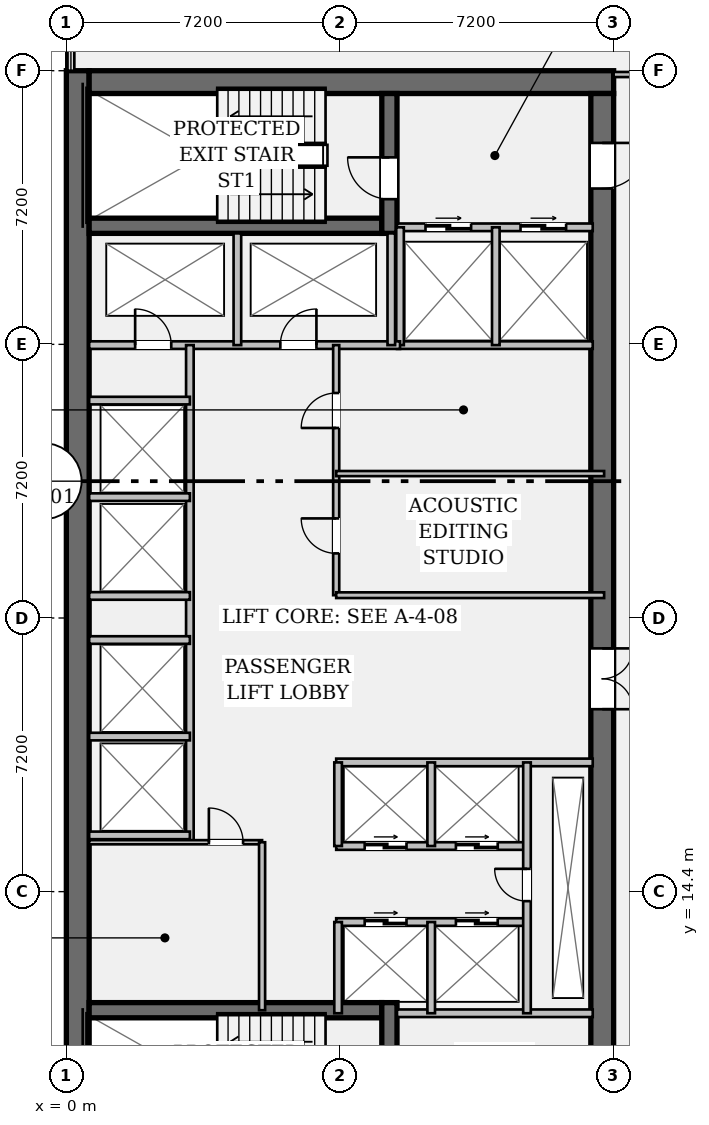
"""IFC4 building model, lengths in metres.
Left out: names, types, materials, properties, quantities, classifications, styles, units other than length and angle.
Written with IfcOpenShell. Run it as: python <this file> out.ifc"""

import sys

from ifc_helpers import new_model, si_unit, direction, frame, frame_2d, origin, place, context, subcontext, project, spatial, rectangle, extrude, element, fill, save


model = new_model("IFC4")
c1 = context("Model", 3, precision=1e-05, world=origin(), true_north=direction((0.0, 1.0)))
c2 = subcontext(c1, "Body", "Model", "MODEL_VIEW")
j1 = project(units=[si_unit("LENGTHUNIT", "METRE"), si_unit("PLANEANGLEUNIT", "RADIAN")], contexts=[c1])
p1 = place(None, origin())
s1 = spatial("IfcSite", under=j1, at=p1, CompositionType="ELEMENT")
p2 = place(p1, origin())
s2 = spatial("IfcBuilding", under=s1, at=p2, CompositionType="ELEMENT")
p3 = place(p2, frame((0.0, 0.0, 125.3)))
s3 = spatial("IfcBuildingStorey", under=s2, at=p3, CompositionType="ELEMENT", Elevation=125.3)
p4 = place(p3, frame((0.3, 7.2, 0.0), z_axis=(0.0, 0.0, 1.0), x_axis=(0.0, 1.0, 0.0)))
e1 = element("IfcWall", 1, at=p4, inside=s3, PredefinedType="SHEAR", context=c2, shape_type="SweptSolid", body=[
    extrude(rectangle(XDim=28.8, YDim=0.6, at=frame_2d((14.4, 0.0))), origin(), (0.0, 0.0, 1.0), 3.58),
])
p5 = place(p3, frame((0.6, 35.7, 0.0), z_axis=(0.0, 0.0, 1.0), x_axis=(1.0, 0.0, 0.0)))
e2 = element("IfcWall", 2, at=p5, inside=s3, PredefinedType="SHEAR", context=c2, shape_type="SweptSolid", body=[
    extrude(rectangle(XDim=13.8, YDim=0.6, at=frame_2d((6.9, 0.0))), origin(), (0.0, 0.0, 1.0), 3.58),
])
p6 = place(p3, frame((14.1, 35.4, 0.0), z_axis=(0.0, 0.0, 1.0), x_axis=(0.0, -1.0, 0.0)))
e3 = element("IfcWall", 3, at=p6, inside=s3, PredefinedType="SHEAR", context=c2, shape_type="SweptSolid", body=[
    extrude(rectangle(XDim=27.6, YDim=0.6, at=frame_2d((13.8, 0.0))), origin(), (0.0, 0.0, 1.0), 3.58),
])
p7 = place(p6, frame((1.3, 0.0, 0.0)))
e4 = element("IfcOpeningElement", 4, at=p7, cuts=e3, PredefinedType="OPENING", context=c2, shape_type="SweptSolid", body=[
    extrude(rectangle(XDim=1.2, YDim=2.15, at=frame_2d((0.6, 1.075))), frame((0.0, 0.312, 0.0), z_axis=(0.0, -1.0, 0.0), x_axis=(1.0, 0.0, 0.0)), (0.0, 0.0, 1.0), 0.624),
])
p8 = place(p6, frame((25.25, 0.0, 0.0)))
e5 = element("IfcOpeningElement", 5, at=p8, cuts=e3, PredefinedType="OPENING", context=c2, shape_type="SweptSolid", body=[
    extrude(rectangle(XDim=1.2, YDim=2.15, at=frame_2d((0.6, 1.075))), frame((0.0, 0.312, 0.0), z_axis=(0.0, -1.0, 0.0), x_axis=(1.0, 0.0, 0.0)), (0.0, 0.0, 1.0), 0.624),
])
p9 = place(p6, frame((14.6, 0.0, 0.0)))
e6 = element("IfcOpeningElement", 6, at=p9, cuts=e3, PredefinedType="OPENING", context=c2, shape_type="SweptSolid", body=[
    extrude(rectangle(XDim=1.6, YDim=2.2, at=frame_2d((0.8, 1.1))), frame((0.0, 0.312, 0.0), z_axis=(0.0, -1.0, 0.0), x_axis=(1.0, 0.0, 0.0)), (0.0, 0.0, 1.0), 0.624),
])
for number, where, z_axis, x_axis in (
    (7, (0.6, 31.92, 0.0), (0.0, 0.0, 1.0), (1.0, 0.0, 0.0)),
    (8, (0.6, 11.28, 0.0), (0.0, 0.0, 1.0), (1.0, 0.0, 0.0)),
):
    element("IfcWall", number, at=place(p3, frame(where, z_axis=z_axis, x_axis=x_axis)), inside=s3, PredefinedType="SHEAR", context=c2, shape_type="SweptSolid", body=[
        extrude(rectangle(XDim=7.7, YDim=0.4, at=frame_2d((3.85, 0.0))), origin(), (0.0, 0.0, 1.0), 3.58),
    ])
p10 = place(p3, frame((8.5, 31.72, 0.0), z_axis=(0.0, 0.0, 1.0), x_axis=(0.0, 1.0, 0.0)))
e9 = element("IfcWall", 9, at=p10, inside=s3, PredefinedType="SHEAR", context=c2, shape_type="SweptSolid", body=[
    extrude(rectangle(XDim=3.68, YDim=0.4, at=frame_2d((1.84, 0.0))), origin(), (0.0, 0.0, 1.0), 3.58),
])
p11 = place(p10, frame((0.9, 0.0, 0.0)))
e10 = element("IfcOpeningElement", 10, at=p11, cuts=e9, PredefinedType="OPENING", context=c2, shape_type="SweptSolid", body=[
    extrude(rectangle(XDim=1.1, YDim=2.15, at=frame_2d((0.55, 1.075))), frame((0.0, 0.212, 0.0), z_axis=(0.0, -1.0, 0.0), x_axis=(1.0, 0.0, 0.0)), (0.0, 0.0, 1.0), 0.424),
])
p12 = place(p3, frame((8.5, 7.8, 0.0), z_axis=(0.0, 0.0, 1.0), x_axis=(0.0, 1.0, 0.0)))
e11 = element("IfcWall", 11, at=p12, inside=s3, PredefinedType="SHEAR", context=c2, shape_type="SweptSolid", body=[
    extrude(rectangle(XDim=3.68, YDim=0.4, at=frame_2d((1.84, 0.0))), origin(), (0.0, 0.0, 1.0), 3.58),
])
p13 = place(p12, frame((0.85, 0.0, 0.0)))
e12 = element("IfcOpeningElement", 12, at=p13, cuts=e11, PredefinedType="OPENING", context=c2, shape_type="SweptSolid", body=[
    extrude(rectangle(XDim=1.1, YDim=2.15, at=frame_2d((0.55, 1.075))), frame((0.0, 0.212, 0.0), z_axis=(0.0, -1.0, 0.0), x_axis=(1.0, 0.0, 0.0)), (0.0, 0.0, 1.0), 0.424),
])
p14 = place(p3, frame((8.7, 31.88, 0.0), z_axis=(0.0, 0.0, 1.0), x_axis=(1.0, 0.0, 0.0)))
e13 = element("IfcWall", 13, at=p14, inside=s3, PredefinedType="PARTITIONING", context=c2, shape_type="SweptSolid", body=[
    extrude(rectangle(XDim=5.15, YDim=0.2, at=frame_2d((2.575, 0.0))), origin(), (0.0, 0.0, 1.0), 3.58),
])
p15 = place(p14, frame((0.75, 0.0, 0.0)))
e14 = element("IfcOpeningElement", 14, at=p15, cuts=e13, PredefinedType="OPENING", context=c2, shape_type="SweptSolid", body=[
    extrude(rectangle(XDim=1.2, YDim=2.2, at=frame_2d((0.6, 1.1))), frame((0.0, 0.112, 0.0), z_axis=(0.0, -1.0, 0.0), x_axis=(1.0, 0.0, 0.0)), (0.0, 0.0, 1.0), 0.224),
])
p16 = place(p14, frame((3.25, 0.0, 0.0)))
e15 = element("IfcOpeningElement", 15, at=p16, cuts=e13, PredefinedType="OPENING", context=c2, shape_type="SweptSolid", body=[
    extrude(rectangle(XDim=1.2, YDim=2.2, at=frame_2d((0.6, 1.1))), frame((0.0, 0.112, 0.0), z_axis=(0.0, -1.0, 0.0), x_axis=(1.0, 0.0, 0.0)), (0.0, 0.0, 1.0), 0.224),
])
for number, where, z_axis, x_axis in (
    (16, (8.7, 11.2, 0.0), (0.0, 0.0, 1.0), (1.0, 0.0, 0.0)),
    (17, (8.7, 28.78, 0.0), (0.0, 0.0, 1.0), (1.0, 0.0, 0.0)),
):
    element("IfcWall", number, at=place(p3, frame(where, z_axis=z_axis, x_axis=x_axis)), inside=s3, PredefinedType="PARTITIONING", context=c2, shape_type="SweptSolid", body=[
        extrude(rectangle(XDim=5.15, YDim=0.2, at=frame_2d((2.575, 0.0))), origin(), (0.0, 0.0, 1.0), 3.58),
    ])
for number, where, z_axis, x_axis in (
    (18, (8.78, 28.78, 0.0), (0.0, 0.0, 1.0), (0.0, 1.0, 0.0)),
    (19, (11.3, 28.78, 0.0), (0.0, 0.0, 1.0), (0.0, 1.0, 0.0)),
):
    element("IfcWall", number, at=place(p3, frame(where, z_axis=z_axis, x_axis=x_axis)), inside=s3, PredefinedType="PARTITIONING", context=c2, shape_type="SweptSolid", body=[
        extrude(rectangle(XDim=3.1, YDim=0.2, at=frame_2d((1.55, 0.0))), origin(), (0.0, 0.0, 1.0), 3.58),
    ])
p17 = place(p3, frame((0.6, 28.78, 0.0), z_axis=(0.0, 0.0, 1.0), x_axis=(1.0, 0.0, 0.0)))
e20 = element("IfcWall", 20, at=p17, inside=s3, PredefinedType="PARTITIONING", context=c2, shape_type="SweptSolid", body=[
    extrude(rectangle(XDim=8.18, YDim=0.2, at=frame_2d((4.09, 0.0))), origin(), (0.0, 0.0, 1.0), 3.58),
])
p18 = place(p17, frame((1.21, 0.0, 0.0)))
e21 = element("IfcOpeningElement", 21, at=p18, cuts=e20, PredefinedType="OPENING", context=c2, shape_type="SweptSolid", body=[
    extrude(rectangle(XDim=0.95, YDim=2.15, at=frame_2d((0.475, 1.075))), frame((0.0, 0.112, 0.0), z_axis=(0.0, -1.0, 0.0), x_axis=(1.0, 0.0, 0.0)), (0.0, 0.0, 1.0), 0.224),
])
p19 = place(p17, frame((5.03, 0.0, 0.0)))
e22 = element("IfcOpeningElement", 22, at=p19, cuts=e20, PredefinedType="OPENING", context=c2, shape_type="SweptSolid", body=[
    extrude(rectangle(XDim=0.95, YDim=2.15, at=frame_2d((0.475, 1.075))), frame((0.0, 0.112, 0.0), z_axis=(0.0, -1.0, 0.0), x_axis=(1.0, 0.0, 0.0)), (0.0, 0.0, 1.0), 0.224),
])
for number, where, z_axis, x_axis in (
    (23, (4.5, 28.78, 0.0), (0.0, 0.0, 1.0), (0.0, 1.0, 0.0)),
    (24, (8.55, 28.78, 0.0), (0.0, 0.0, 1.0), (0.0, 1.0, 0.0)),
):
    element("IfcWall", number, at=place(p3, frame(where, z_axis=z_axis, x_axis=x_axis)), inside=s3, PredefinedType="PARTITIONING", context=c2, shape_type="SweptSolid", body=[
        extrude(rectangle(XDim=2.94, YDim=0.2, at=frame_2d((1.47, 0.0))), origin(), (0.0, 0.0, 1.0), 3.58),
    ])
p20 = place(p3, frame((3.25, 15.7, 0.0), z_axis=(0.0, 0.0, 1.0), x_axis=(0.0, 1.0, 0.0)))
e25 = element("IfcWall", 25, at=p20, inside=s3, PredefinedType="PARTITIONING", context=c2, shape_type="SweptSolid", body=[
    extrude(rectangle(XDim=13.08, YDim=0.2, at=frame_2d((6.54, 0.0))), origin(), (0.0, 0.0, 1.0), 3.58),
])
for number, where, z_axis, x_axis in (
    (26, (0.6, 15.88, 0.0), (0.0, 0.0, 1.0), (1.0, 0.0, 0.0)),
    (27, (0.6, 18.48, 0.0), (0.0, 0.0, 1.0), (1.0, 0.0, 0.0)),
    (28, (0.6, 22.18, 0.0), (0.0, 0.0, 1.0), (1.0, 0.0, 0.0)),
    (29, (0.6, 24.78, 0.0), (0.0, 0.0, 1.0), (1.0, 0.0, 0.0)),
    (30, (0.6, 21.02, 0.0), (0.0, 0.0, 1.0), (1.0, 0.0, 0.0)),
    (31, (0.6, 27.32, 0.0), (0.0, 0.0, 1.0), (1.0, 0.0, 0.0)),
):
    element("IfcWall", number, at=place(p3, frame(where, z_axis=z_axis, x_axis=x_axis)), inside=s3, PredefinedType="PARTITIONING", context=c2, shape_type="SweptSolid", body=[
        extrude(rectangle(XDim=2.65, YDim=0.2, at=frame_2d((1.325, 0.0))), origin(), (0.0, 0.0, 1.0), 3.58),
    ])
p21 = place(p3, frame((7.1, 22.2, 0.0), z_axis=(0.0, 0.0, 1.0), x_axis=(0.0, 1.0, 0.0)))
e32 = element("IfcWall", 32, at=p21, inside=s3, PredefinedType="PARTITIONING", context=c2, shape_type="SweptSolid", body=[
    extrude(rectangle(XDim=6.58, YDim=0.16, at=frame_2d((3.29, 0.0))), origin(), (0.0, 0.0, 1.0), 3.58),
])
p22 = place(p21, frame((1.1, 0.0, 0.0)))
e33 = element("IfcOpeningElement", 33, at=p22, cuts=e32, PredefinedType="OPENING", context=c2, shape_type="SweptSolid", body=[
    extrude(rectangle(XDim=0.92, YDim=2.15, at=frame_2d((0.46, 1.075))), frame((0.0, 0.092, 0.0), z_axis=(0.0, -1.0, 0.0), x_axis=(1.0, 0.0, 0.0)), (0.0, 0.0, 1.0), 0.184),
])
p23 = place(p21, frame((4.4, 0.0, 0.0)))
e34 = element("IfcOpeningElement", 34, at=p23, cuts=e32, PredefinedType="OPENING", context=c2, shape_type="SweptSolid", body=[
    extrude(rectangle(XDim=0.92, YDim=2.15, at=frame_2d((0.46, 1.075))), frame((0.0, 0.092, 0.0), z_axis=(0.0, -1.0, 0.0), x_axis=(1.0, 0.0, 0.0)), (0.0, 0.0, 1.0), 0.184),
])
p24 = place(p3, frame((7.1, 22.2, 0.0), z_axis=(0.0, 0.0, 1.0), x_axis=(1.0, 0.0, 0.0)))
e35 = element("IfcWall", 35, at=p24, inside=s3, PredefinedType="PARTITIONING", context=c2, shape_type="SweptSolid", body=[
    extrude(rectangle(XDim=7.05, YDim=0.15, at=frame_2d((3.525, 0.0))), origin(), (0.0, 0.0, 1.0), 3.58),
])
p25 = place(p3, frame((7.1, 25.4, 0.0), z_axis=(0.0, 0.0, 1.0), x_axis=(1.0, 0.0, 0.0)))
e36 = element("IfcWall", 36, at=p25, inside=s3, PredefinedType="PARTITIONING", context=c2, shape_type="SweptSolid", body=[
    extrude(rectangle(XDim=7.05, YDim=0.135, at=frame_2d((3.525, 0.0))), origin(), (0.0, 0.0, 1.0), 3.58),
])
p26 = place(p3, frame((7.1, 17.8, 0.0), z_axis=(0.0, 0.0, 1.0), x_axis=(1.0, 0.0, 0.0)))
e37 = element("IfcWall", 37, at=p26, inside=s3, PredefinedType="PARTITIONING", context=c2, shape_type="SweptSolid", body=[
    extrude(rectangle(XDim=6.75, YDim=0.2, at=frame_2d((3.375, 0.0))), origin(), (0.0, 0.0, 1.0), 3.58),
])
p27 = place(p3, frame((7.1, 15.6, 0.0), z_axis=(0.0, 0.0, 1.0), x_axis=(1.0, 0.0, 0.0)))
e38 = element("IfcWall", 38, at=p27, inside=s3, PredefinedType="PARTITIONING", context=c2, shape_type="SweptSolid", body=[
    extrude(rectangle(XDim=5.02, YDim=0.2, at=frame_2d((2.51, 0.0))), origin(), (0.0, 0.0, 1.0), 3.58),
])
p28 = place(p27, frame((0.75, 0.0, 0.0)))
e39 = element("IfcOpeningElement", 39, at=p28, cuts=e38, PredefinedType="OPENING", context=c2, shape_type="SweptSolid", body=[
    extrude(rectangle(XDim=1.1, YDim=2.2, at=frame_2d((0.55, 1.1))), frame((0.0, 0.112, 0.0), z_axis=(0.0, -1.0, 0.0), x_axis=(1.0, 0.0, 0.0)), (0.0, 0.0, 1.0), 0.224),
])
p29 = place(p27, frame((3.15, 0.0, 0.0)))
e40 = element("IfcOpeningElement", 40, at=p29, cuts=e38, PredefinedType="OPENING", context=c2, shape_type="SweptSolid", body=[
    extrude(rectangle(XDim=1.1, YDim=2.2, at=frame_2d((0.55, 1.1))), frame((0.0, 0.112, 0.0), z_axis=(0.0, -1.0, 0.0), x_axis=(1.0, 0.0, 0.0)), (0.0, 0.0, 1.0), 0.224),
])
p30 = place(p3, frame((7.1, 13.6, 0.0), z_axis=(0.0, 0.0, 1.0), x_axis=(1.0, 0.0, 0.0)))
e41 = element("IfcWall", 41, at=p30, inside=s3, PredefinedType="PARTITIONING", context=c2, shape_type="SweptSolid", body=[
    extrude(rectangle(XDim=5.02, YDim=0.2, at=frame_2d((2.51, 0.0))), origin(), (0.0, 0.0, 1.0), 3.58),
])
p31 = place(p30, frame((0.75, 0.0, 0.0)))
e42 = element("IfcOpeningElement", 42, at=p31, cuts=e41, PredefinedType="OPENING", context=c2, shape_type="SweptSolid", body=[
    extrude(rectangle(XDim=1.1, YDim=2.2, at=frame_2d((0.55, 1.1))), frame((0.0, 0.112, 0.0), z_axis=(0.0, -1.0, 0.0), x_axis=(1.0, 0.0, 0.0)), (0.0, 0.0, 1.0), 0.224),
])
p32 = place(p30, frame((3.15, 0.0, 0.0)))
e43 = element("IfcOpeningElement", 43, at=p32, cuts=e41, PredefinedType="OPENING", context=c2, shape_type="SweptSolid", body=[
    extrude(rectangle(XDim=1.1, YDim=2.2, at=frame_2d((0.55, 1.1))), frame((0.0, 0.112, 0.0), z_axis=(0.0, -1.0, 0.0), x_axis=(1.0, 0.0, 0.0)), (0.0, 0.0, 1.0), 0.224),
])
p33 = place(p3, frame((7.15, 15.6, 0.0), z_axis=(0.0, 0.0, 1.0), x_axis=(0.0, 1.0, 0.0)))
e44 = element("IfcWall", 44, at=p33, inside=s3, PredefinedType="PARTITIONING", context=c2, shape_type="SweptSolid", body=[
    extrude(rectangle(XDim=2.2, YDim=0.2, at=frame_2d((1.1, 0.0))), origin(), (0.0, 0.0, 1.0), 3.58),
])
p34 = place(p3, frame((7.15, 11.2, 0.0), z_axis=(0.0, 0.0, 1.0), x_axis=(0.0, 1.0, 0.0)))
e45 = element("IfcWall", 45, at=p34, inside=s3, PredefinedType="PARTITIONING", context=c2, shape_type="SweptSolid", body=[
    extrude(rectangle(XDim=2.4, YDim=0.2, at=frame_2d((1.2, 0.0))), origin(), (0.0, 0.0, 1.0), 3.58),
])
p35 = place(p3, frame((9.6, 15.6, 0.0), z_axis=(0.0, 0.0, 1.0), x_axis=(0.0, 1.0, 0.0)))
e46 = element("IfcWall", 46, at=p35, inside=s3, PredefinedType="PARTITIONING", context=c2, shape_type="SweptSolid", body=[
    extrude(rectangle(XDim=2.2, YDim=0.2, at=frame_2d((1.1, 0.0))), origin(), (0.0, 0.0, 1.0), 3.58),
])
p36 = place(p3, frame((9.6, 11.2, 0.0), z_axis=(0.0, 0.0, 1.0), x_axis=(0.0, 1.0, 0.0)))
e47 = element("IfcWall", 47, at=p36, inside=s3, PredefinedType="PARTITIONING", context=c2, shape_type="SweptSolid", body=[
    extrude(rectangle(XDim=2.4, YDim=0.2, at=frame_2d((1.2, 0.0))), origin(), (0.0, 0.0, 1.0), 3.58),
])
p37 = place(p3, frame((12.12, 11.2, 0.0), z_axis=(0.0, 0.0, 1.0), x_axis=(0.0, 1.0, 0.0)))
e48 = element("IfcWall", 48, at=p37, inside=s3, PredefinedType="PARTITIONING", context=c2, shape_type="SweptSolid", body=[
    extrude(rectangle(XDim=6.6, YDim=0.2, at=frame_2d((3.3, 0.0))), origin(), (0.0, 0.0, 1.0), 3.58),
])
p38 = place(p37, frame((2.95, 0.0, 0.0)))
e49 = element("IfcOpeningElement", 49, at=p38, cuts=e48, PredefinedType="OPENING", context=c2, shape_type="SweptSolid", body=[
    extrude(rectangle(XDim=0.85, YDim=2.15, at=frame_2d((0.425, 1.075))), frame((0.0, 0.112, 0.0), z_axis=(0.0, -1.0, 0.0), x_axis=(1.0, 0.0, 0.0)), (0.0, 0.0, 1.0), 0.224),
])
p39 = place(p3, frame((0.6, 15.7, 0.0), z_axis=(0.0, 0.0, 1.0), x_axis=(1.0, 0.0, 0.0)))
e50 = element("IfcWall", 50, at=p39, inside=s3, PredefinedType="PARTITIONING", context=c2, shape_type="SweptSolid", body=[
    extrude(rectangle(XDim=4.55, YDim=0.11, at=frame_2d((2.275, 0.0))), origin(), (0.0, 0.0, 1.0), 3.58),
])
p40 = place(p39, frame((3.15, 0.0, 0.0)))
e51 = element("IfcOpeningElement", 51, at=p40, cuts=e50, PredefinedType="OPENING", context=c2, shape_type="SweptSolid", body=[
    extrude(rectangle(XDim=0.9, YDim=2.15, at=frame_2d((0.45, 1.075))), frame((0.0, 0.067, 0.0), z_axis=(0.0, -1.0, 0.0), x_axis=(1.0, 0.0, 0.0)), (0.0, 0.0, 1.0), 0.134),
])
p41 = place(p3, frame((5.15, 11.28, 0.0), z_axis=(0.0, 0.0, 1.0), x_axis=(0.0, 1.0, 0.0)))
e52 = element("IfcWall", 52, at=p41, inside=s3, PredefinedType="PARTITIONING", context=c2, shape_type="SweptSolid", body=[
    extrude(rectangle(XDim=4.42, YDim=0.16, at=frame_2d((2.21, 0.0))), origin(), (0.0, 0.0, 1.0), 3.58),
])
p42 = place(p3, frame((14.4, 35.9, 0.0), z_axis=(0.0, 0.0, 1.0), x_axis=(1.0, 0.0, 0.0)))
e53 = element("IfcWall", 53, at=p42, inside=s3, PredefinedType="PARTITIONING", context=c2, shape_type="SweptSolid", body=[
    extrude(rectangle(XDim=2.95, YDim=0.135, at=frame_2d((1.475, 0.0))), origin(), (0.0, 0.0, 1.0), 2.869),
])
p43 = place(p42, frame((0.95, 0.0, 0.0)))
e54 = element("IfcOpeningElement", 54, at=p43, cuts=e53, PredefinedType="OPENING", context=c2, shape_type="SweptSolid", body=[
    extrude(rectangle(XDim=1.0, YDim=2.15, at=frame_2d((0.5, 1.075))), frame((0.0, 0.08, 0.0), z_axis=(0.0, -1.0, 0.0), x_axis=(1.0, 0.0, 0.0)), (0.0, 0.0, 1.0), 0.159),
])
p44 = place(p11, origin())
e55 = element("IfcDoor", 55, at=p44, inside=s3, OperationType="SINGLE_SWING_RIGHT", PredefinedType="DOOR", context=c2, shape_type="SweptSolid", body=[
    extrude(rectangle(XDim=1.1, YDim=2.15, at=frame_2d((0.55, 1.075))), frame((0.0, 0.025, 0.0), z_axis=(0.0, -1.0, 0.0), x_axis=(1.0, 0.0, 0.0)), (0.0, 0.0, 1.0), 0.05),
])
fill(e10, e55)
p45 = place(p7, origin())
e56 = element("IfcDoor", 56, at=p45, inside=s3, OperationType="SINGLE_SWING_LEFT", PredefinedType="DOOR", context=c2, shape_type="SweptSolid", body=[
    extrude(rectangle(XDim=1.2, YDim=2.15, at=frame_2d((0.6, 1.075))), frame((0.0, 0.025, 0.0), z_axis=(0.0, -1.0, 0.0), x_axis=(1.0, 0.0, 0.0)), (0.0, 0.0, 1.0), 0.05),
])
fill(e4, e56)
p46 = place(p15, origin())
e57 = element("IfcDoor", 57, at=p46, inside=s3, OperationType="DOUBLE_DOOR_SLIDING", PredefinedType="DOOR", context=c2, shape_type="SweptSolid", body=[
    extrude(rectangle(XDim=1.2, YDim=2.2, at=frame_2d((0.6, 1.1))), frame((0.0, 0.025, 0.0), z_axis=(0.0, -1.0, 0.0), x_axis=(1.0, 0.0, 0.0)), (0.0, 0.0, 1.0), 0.05),
])
fill(e14, e57)
p47 = place(p16, origin())
e58 = element("IfcDoor", 58, at=p47, inside=s3, OperationType="DOUBLE_DOOR_SLIDING", PredefinedType="DOOR", context=c2, shape_type="SweptSolid", body=[
    extrude(rectangle(XDim=1.2, YDim=2.2, at=frame_2d((0.6, 1.1))), frame((0.0, 0.025, 0.0), z_axis=(0.0, -1.0, 0.0), x_axis=(1.0, 0.0, 0.0)), (0.0, 0.0, 1.0), 0.05),
])
fill(e15, e58)
p48 = place(p18, origin())
e59 = element("IfcDoor", 59, at=p48, inside=s3, OperationType="SINGLE_SWING_LEFT", PredefinedType="DOOR", context=c2, shape_type="SweptSolid", body=[
    extrude(rectangle(XDim=0.95, YDim=2.15, at=frame_2d((0.475, 1.075))), frame((0.0, 0.025, 0.0), z_axis=(0.0, -1.0, 0.0), x_axis=(1.0, 0.0, 0.0)), (0.0, 0.0, 1.0), 0.05),
])
fill(e21, e59)
p49 = place(p19, origin())
e60 = element("IfcDoor", 60, at=p49, inside=s3, OperationType="SINGLE_SWING_RIGHT", PredefinedType="DOOR", context=c2, shape_type="SweptSolid", body=[
    extrude(rectangle(XDim=0.95, YDim=2.15, at=frame_2d((0.475, 1.075))), frame((0.0, 0.025, 0.0), z_axis=(0.0, -1.0, 0.0), x_axis=(1.0, 0.0, 0.0)), (0.0, 0.0, 1.0), 0.05),
])
fill(e22, e60)
p50 = place(p9, origin())
e61 = element("IfcDoor", 61, at=p50, inside=s3, OperationType="DOUBLE_DOOR_SINGLE_SWING", PredefinedType="DOOR", context=c2, shape_type="SweptSolid", body=[
    extrude(rectangle(XDim=1.6, YDim=2.2, at=frame_2d((0.8, 1.1))), frame((0.0, 0.025, 0.0), z_axis=(0.0, -1.0, 0.0), x_axis=(1.0, 0.0, 0.0)), (0.0, 0.0, 1.0), 0.05),
])
fill(e6, e61)
p51 = place(p22, origin())
e62 = element("IfcDoor", 62, at=p51, inside=s3, OperationType="SINGLE_SWING_RIGHT", PredefinedType="DOOR", context=c2, shape_type="SweptSolid", body=[
    extrude(rectangle(XDim=0.92, YDim=2.15, at=frame_2d((0.46, 1.075))), frame((0.0, 0.025, 0.0), z_axis=(0.0, -1.0, 0.0), x_axis=(1.0, 0.0, 0.0)), (0.0, 0.0, 1.0), 0.05),
])
fill(e33, e62)
p52 = place(p23, origin())
e63 = element("IfcDoor", 63, at=p52, inside=s3, OperationType="SINGLE_SWING_LEFT", PredefinedType="DOOR", context=c2, shape_type="SweptSolid", body=[
    extrude(rectangle(XDim=0.92, YDim=2.15, at=frame_2d((0.46, 1.075))), frame((0.0, 0.025, 0.0), z_axis=(0.0, -1.0, 0.0), x_axis=(1.0, 0.0, 0.0)), (0.0, 0.0, 1.0), 0.05),
])
fill(e34, e63)
p53 = place(p38, origin())
e64 = element("IfcDoor", 64, at=p53, inside=s3, OperationType="SINGLE_SWING_RIGHT", PredefinedType="DOOR", context=c2, shape_type="SweptSolid", body=[
    extrude(rectangle(XDim=0.85, YDim=2.15, at=frame_2d((0.425, 1.075))), frame((0.0, 0.025, 0.0), z_axis=(0.0, -1.0, 0.0), x_axis=(1.0, 0.0, 0.0)), (0.0, 0.0, 1.0), 0.05),
])
fill(e49, e64)
p54 = place(p28, origin())
e65 = element("IfcDoor", 65, at=p54, inside=s3, OperationType="DOUBLE_DOOR_SLIDING", PredefinedType="DOOR", context=c2, shape_type="SweptSolid", body=[
    extrude(rectangle(XDim=1.1, YDim=2.2, at=frame_2d((0.55, 1.1))), frame((0.0, 0.025, 0.0), z_axis=(0.0, -1.0, 0.0), x_axis=(1.0, 0.0, 0.0)), (0.0, 0.0, 1.0), 0.05),
])
fill(e39, e65)
p55 = place(p29, origin())
e66 = element("IfcDoor", 66, at=p55, inside=s3, OperationType="DOUBLE_DOOR_SLIDING", PredefinedType="DOOR", context=c2, shape_type="SweptSolid", body=[
    extrude(rectangle(XDim=1.1, YDim=2.2, at=frame_2d((0.55, 1.1))), frame((0.0, 0.025, 0.0), z_axis=(0.0, -1.0, 0.0), x_axis=(1.0, 0.0, 0.0)), (0.0, 0.0, 1.0), 0.05),
])
fill(e40, e66)
p56 = place(p31, origin())
e67 = element("IfcDoor", 67, at=p56, inside=s3, OperationType="DOUBLE_DOOR_SLIDING", PredefinedType="DOOR", context=c2, shape_type="SweptSolid", body=[
    extrude(rectangle(XDim=1.1, YDim=2.2, at=frame_2d((0.55, 1.1))), frame((0.0, 0.025, 0.0), z_axis=(0.0, -1.0, 0.0), x_axis=(1.0, 0.0, 0.0)), (0.0, 0.0, 1.0), 0.05),
])
fill(e42, e67)
p57 = place(p32, origin())
e68 = element("IfcDoor", 68, at=p57, inside=s3, OperationType="DOUBLE_DOOR_SLIDING", PredefinedType="DOOR", context=c2, shape_type="SweptSolid", body=[
    extrude(rectangle(XDim=1.1, YDim=2.2, at=frame_2d((0.55, 1.1))), frame((0.0, 0.025, 0.0), z_axis=(0.0, -1.0, 0.0), x_axis=(1.0, 0.0, 0.0)), (0.0, 0.0, 1.0), 0.05),
])
fill(e43, e68)
p58 = place(p40, origin())
e69 = element("IfcDoor", 69, at=p58, inside=s3, OperationType="SINGLE_SWING_LEFT", PredefinedType="DOOR", context=c2, shape_type="SweptSolid", body=[
    extrude(rectangle(XDim=0.9, YDim=2.15, at=frame_2d((0.45, 1.075))), frame((0.0, 0.025, 0.0), z_axis=(0.0, -1.0, 0.0), x_axis=(1.0, 0.0, 0.0)), (0.0, 0.0, 1.0), 0.05),
])
fill(e51, e69)
save(model, sys.argv[1])
